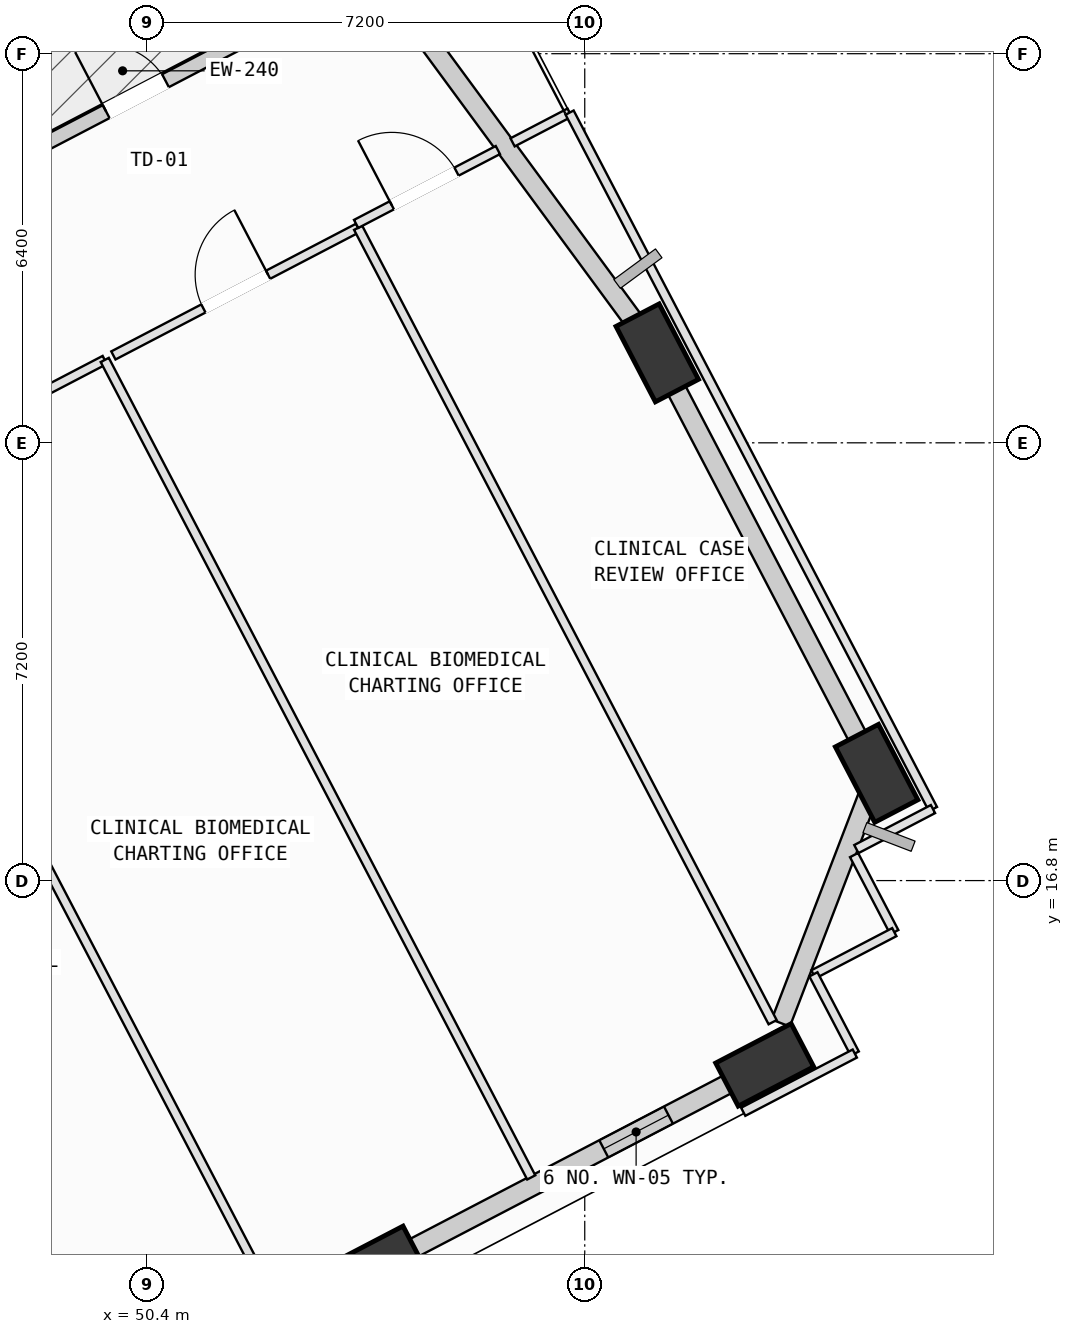
"""IFC4 building model, lengths in metres.
Left out: names, types, materials, properties, quantities, classifications, styles, units other than length and angle.
Written with IfcOpenShell. Run it as: python <this file> out.ifc"""

import sys

from ifc_helpers import new_model, si_unit, direction, frame, frame_2d, origin, origin_2d, place, context, subcontext, project, spatial, rectangle, extrude, element, fill, save


model = new_model("IFC4")
c1 = context("Model", 3, precision=1e-05, world=origin(), true_north=direction((0.0, 1.0)))
c2 = subcontext(c1, "Body", "Model", "MODEL_VIEW")
j1 = project(units=[si_unit("LENGTHUNIT", "METRE"), si_unit("PLANEANGLEUNIT", "RADIAN")], contexts=[c1])
p1 = place(None, origin())
s1 = spatial("IfcSite", under=j1, at=p1, CompositionType="ELEMENT")
p2 = place(p1, origin())
s2 = spatial("IfcBuilding", under=s1, at=p2, CompositionType="ELEMENT")
p3 = place(p2, frame((0.0, 0.0, 140.4)))
s3 = spatial("IfcBuildingStorey", under=s2, at=p3, CompositionType="ELEMENT", Elevation=140.4)
p4 = place(p3, frame((54.176, 10.438, 0.002), z_axis=(0.058518857575, 0.085303916063, 0.994635000999), x_axis=(-0.99135300538, 0.122188130648, 0.047846415258)))
e1 = element("IfcColumn", 1, at=p4, inside=s3, PredefinedType="COLUMN", context=c2, shape_type="SweptSolid", body=[
    extrude(rectangle(XDim=1.4, YDim=0.8, at=origin_2d()), origin(), (0.0, 0.0, 1.0), 3.947),
])
p5 = place(p3, frame((60.559, 13.769, 0.002), z_axis=(0.044521459217, 0.111334608723, 0.992785195583), x_axis=(-0.993722335718, -0.097160543866, 0.055459428507)))
e2 = element("IfcColumn", 2, at=p5, inside=s3, PredefinedType="COLUMN", context=c2, shape_type="SweptSolid", body=[
    extrude(rectangle(XDim=1.4, YDim=0.8, at=origin_2d()), origin(), (0.0, 0.0, 1.0), 3.943),
])
p6 = place(p3, frame((62.4, 18.564, 0.002), z_axis=(0.02468177893, 0.118746090067, 0.992617839797), x_axis=(0.273747681692, -0.955771527158, 0.107531365855)))
e3 = element("IfcColumn", 3, at=p6, inside=s3, PredefinedType="COLUMN", context=c2, shape_type="SweptSolid", body=[
    extrude(rectangle(XDim=1.4, YDim=0.8, at=origin_2d()), origin(), (0.0, 0.0, 1.0), 3.927),
])
p7 = place(p3, frame((58.792, 25.479, 0.002), z_axis=(-0.003662273287, 0.103847173035, 0.994586523339), x_axis=(0.493313659409, -0.864958897802, 0.092128923543)))
e4 = element("IfcColumn", 4, at=p7, inside=s3, PredefinedType="COLUMN", context=c2, shape_type="SweptSolid", body=[
    extrude(rectangle(XDim=1.4, YDim=0.8, at=origin_2d()), origin(), (0.0, 0.0, 1.0), 3.933),
])
p8 = place(p3, frame((47.132, 28.092, 0.0), z_axis=(0.0, 0.0, 1.0), x_axis=(0.886598605973, 0.462539632774, 0.0)))
e5 = element("IfcWall", 5, at=p8, inside=s3, PredefinedType="SOLIDWALL", context=c2, shape_type="SweptSolid", body=[
    extrude(rectangle(XDim=6.96, YDim=0.24, at=frame_2d((3.48, 0.0))), origin(), (0.0, 0.0, 1.0), 2.885),
])
p9 = place(p8, frame((2.93, 0.0, 0.0)))
e6 = element("IfcOpeningElement", 6, at=p9, cuts=e5, PredefinedType="OPENING", context=c2, shape_type="SweptSolid", body=[
    extrude(rectangle(XDim=1.1, YDim=2.15, at=frame_2d((0.55, 1.075))), frame((0.0, 0.13, 0.0), z_axis=(0.0, -1.0, 0.0), x_axis=(1.0, 0.0, 0.0)), (0.0, 0.0, 1.0), 0.26),
])
p10 = place(p3, frame((60.304, 13.635, 0.0), z_axis=(0.0, 0.0, 1.0), x_axis=(-0.886605766412, -0.462525907344, 0.0)))
e7 = element("IfcWall", 7, at=p10, inside=s3, PredefinedType="SOLIDWALL", context=c2, shape_type="SweptSolid", body=[
    extrude(rectangle(XDim=6.242, YDim=0.32, at=frame_2d((3.121, 0.0))), origin(), (0.0, 0.0, 1.0), 3.085),
])
p11 = place(p10, frame((1.498, 0.0, 0.75)))
e8 = element("IfcOpeningElement", 8, at=p11, cuts=e7, PredefinedType="OPENING", context=c2, shape_type="SweptSolid", body=[
    extrude(rectangle(XDim=1.2, YDim=1.75, at=frame_2d((0.6, 0.875))), frame((0.0, 0.17, 0.0), z_axis=(0.0, -1.0, 0.0), x_axis=(1.0, 0.0, 0.0)), (0.0, 0.0, 1.0), 0.34),
])
p12 = place(p3, frame((62.309, 18.327, 0.0), z_axis=(0.0, 0.0, 1.0), x_axis=(-0.358387003221, -0.933573112253, 0.0)))
e9 = element("IfcWall", 9, at=p12, inside=s3, PredefinedType="SOLIDWALL", context=c2, shape_type="SweptSolid", body=[
    extrude(rectangle(XDim=4.145, YDim=0.32, at=frame_2d((2.073, 0.0))), origin(), (0.0, 0.0, 1.0), 3.085),
])
p13 = place(p3, frame((58.931, 25.214, 0.0), z_axis=(0.0, 0.0, 1.0), x_axis=(0.462537951062, -0.886599483322, 0.0)))
e10 = element("IfcWall", 10, at=p13, inside=s3, PredefinedType="SOLIDWALL", context=c2, shape_type="SweptSolid", body=[
    extrude(rectangle(XDim=6.84, YDim=0.32, at=frame_2d((3.42, 0.0))), origin(), (0.0, 0.0, 1.0), 3.085),
])
p14 = place(p3, frame((53.167, 33.125, 0.0), z_axis=(0.0, 0.0, 1.0), x_axis=(0.592579759448, -0.805511780604, 0.0)))
e11 = element("IfcWall", 11, at=p14, inside=s3, PredefinedType="SOLIDWALL", context=c2, shape_type="SweptSolid", body=[
    extrude(rectangle(XDim=8.838, YDim=0.32, at=frame_2d((4.419, 0.0))), origin(), (0.0, 0.0, 1.0), 3.085),
])
p15 = place(p3, frame((45.539, 23.189, 0.0), z_axis=(0.0, 0.0, 1.0), x_axis=(0.462519238892, -0.886609245189, 0.0)))
e12 = element("IfcWall", 12, at=p15, inside=s3, PredefinedType="PARTITIONING", context=c2, shape_type="SweptSolid", body=[
    extrude(rectangle(XDim=15.165, YDim=0.15, at=frame_2d((7.582, 0.0))), origin(), (0.0, 0.0, 1.0), 3.285),
])
p16 = place(p3, frame((45.681, 23.263, 0.0), z_axis=(0.0, 0.0, 1.0), x_axis=(0.886582928488, 0.462569682225, 0.0)))
e13 = element("IfcWall", 13, at=p16, inside=s3, PredefinedType="PARTITIONING", context=c2, shape_type="SweptSolid", body=[
    extrude(rectangle(XDim=4.54, YDim=0.15, at=frame_2d((2.27, 0.0))), origin(), (0.0, 0.0, 1.0), 3.7),
])
p17 = place(p16, frame((1.67, 0.0, 0.0)))
e14 = element("IfcOpeningElement", 14, at=p17, cuts=e13, PredefinedType="OPENING", context=c2, shape_type="SweptSolid", body=[
    extrude(rectangle(XDim=1.2, YDim=2.15, at=frame_2d((0.6, 1.075))), frame((0.0, 0.085, 0.0), z_axis=(0.0, -1.0, 0.0), x_axis=(1.0, 0.0, 0.0)), (0.0, 0.0, 1.0), 0.17),
])
p18 = place(p3, frame((49.706, 25.363, 0.0), z_axis=(0.0, 0.0, 1.0), x_axis=(0.462519238892, -0.886609245189, 0.0)))
e15 = element("IfcWall", 15, at=p18, inside=s3, PredefinedType="PARTITIONING", context=c2, shape_type="SweptSolid", body=[
    extrude(rectangle(XDim=15.165, YDim=0.15, at=frame_2d((7.582, 0.0))), origin(), (0.0, 0.0, 1.0), 3.7),
])
p19 = place(p3, frame((49.848, 25.437, 0.0), z_axis=(0.0, 0.0, 1.0), x_axis=(0.886582928488, 0.462569682225, 0.0)))
e16 = element("IfcWall", 16, at=p19, inside=s3, PredefinedType="PARTITIONING", context=c2, shape_type="SweptSolid", body=[
    extrude(rectangle(XDim=4.54, YDim=0.15, at=frame_2d((2.27, 0.0))), origin(), (0.0, 0.0, 1.0), 3.7),
])
p20 = place(p19, frame((1.67, 0.0, 0.0)))
e17 = element("IfcOpeningElement", 17, at=p20, cuts=e16, PredefinedType="OPENING", context=c2, shape_type="SweptSolid", body=[
    extrude(rectangle(XDim=1.2, YDim=2.15, at=frame_2d((0.6, 1.075))), frame((0.0, 0.085, 0.0), z_axis=(0.0, -1.0, 0.0), x_axis=(1.0, 0.0, 0.0)), (0.0, 0.0, 1.0), 0.17),
])
p21 = place(p3, frame((53.873, 27.537, 0.0), z_axis=(0.0, 0.0, 1.0), x_axis=(0.462553551442, -0.886591344447, 0.0)))
e18 = element("IfcWall", 18, at=p21, inside=s3, PredefinedType="PARTITIONING", context=c2, shape_type="SweptSolid", body=[
    extrude(rectangle(XDim=14.738, YDim=0.15, at=frame_2d((7.369, 0.0))), origin(), (0.0, 0.0, 1.0), 3.7),
])
p22 = place(p3, frame((60.758, 14.339, 0.0), z_axis=(0.0, 0.0, 1.0), x_axis=(0.462462365463, -0.886638912145, 0.0)))
e19 = element("IfcWall", 19, at=p22, inside=s3, PredefinedType="PARTITIONING", context=c2, shape_type="SweptSolid", body=[
    extrude(rectangle(XDim=0.644, YDim=0.15, at=frame_2d((0.322, 0.0))), origin(), (0.0, 0.0, 1.0), 3.7),
])
p23 = place(p3, frame((61.056, 13.768, 0.0), z_axis=(0.0, 0.0, 1.0), x_axis=(-0.886231703608, -0.463242234172, 0.0)))
e20 = element("IfcWall", 20, at=p23, inside=s3, PredefinedType="PARTITIONING", context=c2, shape_type="SweptSolid", body=[
    extrude(rectangle(XDim=0.728, YDim=0.15, at=frame_2d((0.364, 0.0))), origin(), (0.0, 0.0, 1.0), 3.7),
])
p24 = place(p3, frame((62.029, 17.22, 0.0), z_axis=(0.0, 0.0, 1.0), x_axis=(0.462711826068, -0.886508751235, 0.0)))
e21 = element("IfcWall", 21, at=p24, inside=s3, PredefinedType="PARTITIONING", context=c2, shape_type="SweptSolid", body=[
    extrude(rectangle(XDim=1.43, YDim=0.15, at=frame_2d((0.715, 0.0))), origin(), (0.0, 0.0, 1.0), 3.7),
])
p25 = place(p3, frame((62.691, 15.952, 0.0), z_axis=(0.0, 0.0, 1.0), x_axis=(-0.88657904171, -0.462577131731, 0.0)))
e22 = element("IfcWall", 22, at=p25, inside=s3, PredefinedType="PARTITIONING", context=c2, shape_type="SweptSolid", body=[
    extrude(rectangle(XDim=1.5, YDim=0.15, at=frame_2d((0.75, 0.0))), origin(), (0.0, 0.0, 1.0), 3.7),
])
p26 = place(p3, frame((61.361, 15.258, 0.0), z_axis=(0.0, 0.0, 1.0), x_axis=(0.462628452694, -0.886552262846, 0.0)))
e23 = element("IfcWall", 23, at=p26, inside=s3, PredefinedType="PARTITIONING", context=c2, shape_type="SweptSolid", body=[
    extrude(rectangle(XDim=1.47, YDim=0.15, at=frame_2d((0.735, 0.0))), origin(), (0.0, 0.0, 1.0), 3.7),
])
p27 = place(p3, frame((62.041, 13.955, 0.0), z_axis=(0.0, 0.0, 1.0), x_axis=(-0.886458633583, -0.462807833712, 0.0)))
e24 = element("IfcWall", 24, at=p27, inside=s3, PredefinedType="PARTITIONING", context=c2, shape_type="SweptSolid", body=[
    extrude(rectangle(XDim=2.07, YDim=0.15, at=frame_2d((1.035, 0.0))), origin(), (0.0, 0.0, 1.0), 3.7),
])
p28 = place(p3, frame((53.84, 27.6, 0.0), z_axis=(0.0, 0.0, 1.0), x_axis=(0.88677688927, 0.462197737615, 0.0)))
e25 = element("IfcWall", 25, at=p28, inside=s3, PredefinedType="PARTITIONING", context=c2, shape_type="SweptSolid", body=[
    extrude(rectangle(XDim=2.628, YDim=0.15, at=frame_2d((1.314, 0.0))), origin(), (0.0, 0.0, 1.0), 3.7),
])
p29 = place(p28, frame((0.662, 0.0, 0.0)))
e26 = element("IfcOpeningElement", 26, at=p29, cuts=e25, PredefinedType="OPENING", context=c2, shape_type="SweptSolid", body=[
    extrude(rectangle(XDim=1.2, YDim=2.15, at=frame_2d((0.6, 1.075))), frame((0.0, 0.085, 0.0), z_axis=(0.0, -1.0, 0.0), x_axis=(1.0, 0.0, 0.0)), (0.0, 0.0, 1.0), 0.17),
])
p30 = place(p3, frame((56.413, 28.942, 0.0), z_axis=(0.0, 0.0, 1.0), x_axis=(0.886728838072, 0.462289917402, 0.0)))
e27 = element("IfcWall", 27, at=p30, inside=s3, PredefinedType="PARTITIONING", context=c2, shape_type="SweptSolid", body=[
    extrude(rectangle(XDim=1.058, YDim=0.15, at=frame_2d((0.529, 0.0))), origin(), (0.0, 0.0, 1.0), 3.7),
])
p31 = place(p3, frame((57.351, 29.431, 0.0), z_axis=(0.0, 0.0, 1.0), x_axis=(0.462529196061, -0.886604050741, 0.0)))
e28 = element("IfcWall", 28, at=p31, inside=s3, PredefinedType="PARTITIONING", context=c2, shape_type="SweptSolid", body=[
    extrude(rectangle(XDim=12.92, YDim=0.15, at=frame_2d((6.46, 0.0))), origin(), (0.0, 0.0, 1.0), 3.085),
])
p32 = place(p3, frame((63.327, 17.976, 0.0), z_axis=(0.0, 0.0, 1.0), x_axis=(-0.886422480211, -0.462877075018, 0.0)))
e29 = element("IfcWall", 29, at=p32, inside=s3, PredefinedType="PARTITIONING", context=c2, shape_type="SweptSolid", body=[
    extrude(rectangle(XDim=1.421, YDim=0.15, at=frame_2d((0.711, 0.0))), origin(), (0.0, 0.0, 1.0), 3.7),
])
p33 = place(p9, origin())
e30 = element("IfcDoor", 30, at=p33, inside=s3, OperationType="SINGLE_SWING_LEFT", PredefinedType="DOOR", context=c2, shape_type="SweptSolid", body=[
    extrude(rectangle(XDim=1.1, YDim=2.15, at=frame_2d((0.55, 1.075))), frame((0.0, 0.025, 0.0), z_axis=(0.0, -1.0, 0.0), x_axis=(1.0, 0.0, 0.0)), (0.0, 0.0, 1.0), 0.05),
])
fill(e6, e30)
p34 = place(p11, origin())
e31 = element("IfcWindow", 31, at=p34, inside=s3, PartitioningType="SINGLE_PANEL", PredefinedType="WINDOW", context=c2, shape_type="SweptSolid", body=[
    extrude(rectangle(XDim=1.2, YDim=1.75, at=frame_2d((0.6, 0.875))), frame((0.0, 0.03, 0.0), z_axis=(0.0, -1.0, 0.0), x_axis=(1.0, 0.0, 0.0)), (0.0, 0.0, 1.0), 0.06),
])
fill(e8, e31)
p35 = place(p20, origin())
e32 = element("IfcDoor", 32, at=p35, inside=s3, OperationType="SINGLE_SWING_RIGHT", PredefinedType="DOOR", context=c2, shape_type="SweptSolid", body=[
    extrude(rectangle(XDim=1.2, YDim=2.15, at=frame_2d((0.6, 1.075))), frame((0.0, 0.025, 0.0), z_axis=(0.0, -1.0, 0.0), x_axis=(1.0, 0.0, 0.0)), (0.0, 0.0, 1.0), 0.05),
])
fill(e17, e32)
p36 = place(p29, origin())
e33 = element("IfcDoor", 33, at=p36, inside=s3, OperationType="SINGLE_SWING_LEFT", PredefinedType="DOOR", context=c2, shape_type="SweptSolid", body=[
    extrude(rectangle(XDim=1.2, YDim=2.15, at=frame_2d((0.6, 1.075))), frame((0.0, 0.025, 0.0), z_axis=(0.0, -1.0, 0.0), x_axis=(1.0, 0.0, 0.0)), (0.0, 0.0, 1.0), 0.05),
])
fill(e26, e33)
save(model, sys.argv[1])
